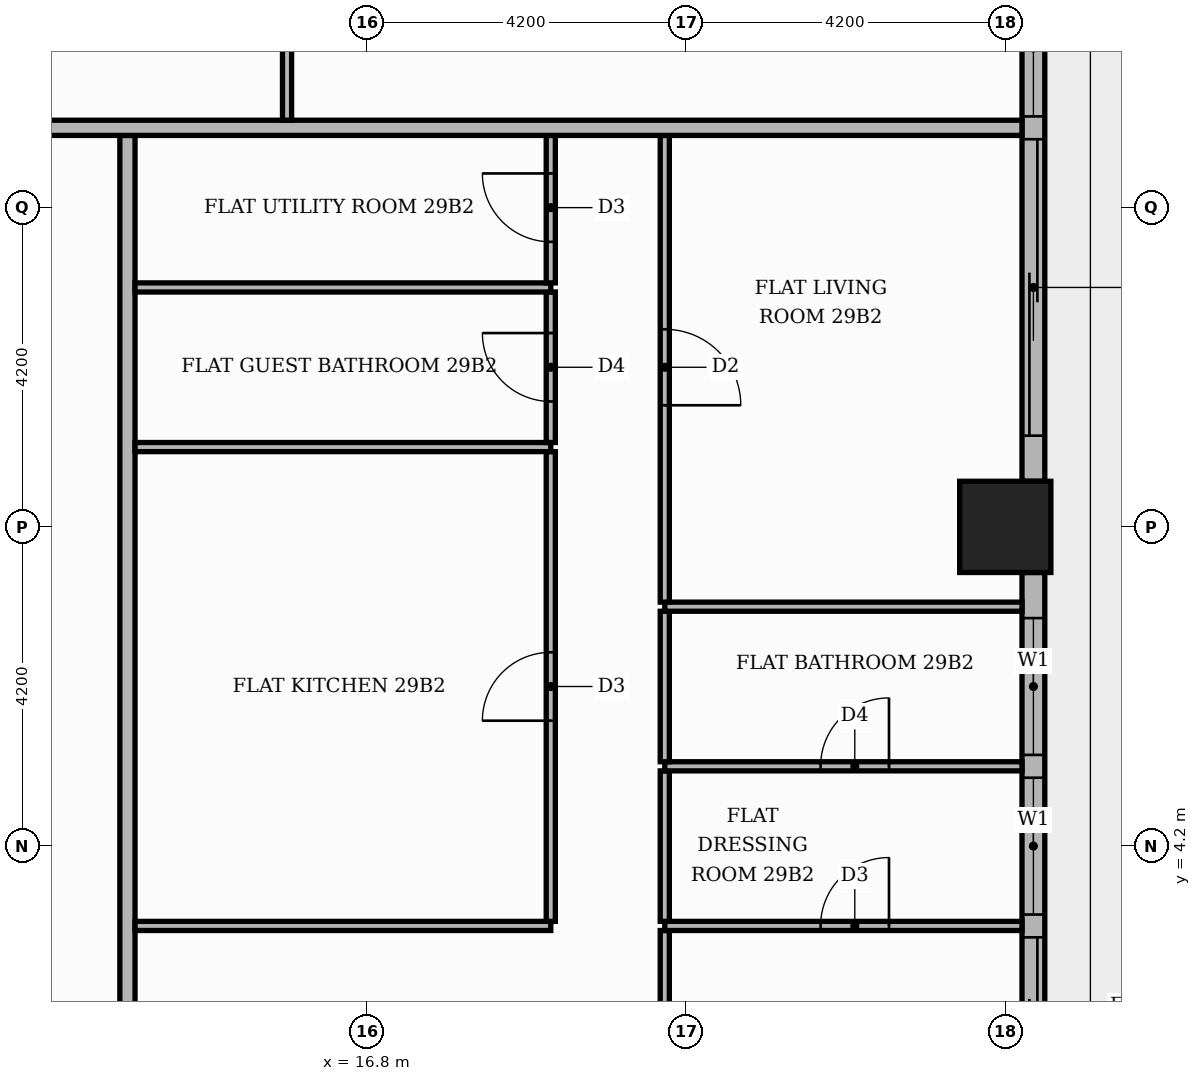
"""IFC4 building model, lengths in metres.
Left out: names, types, materials, properties, quantities, classifications, styles, units other than length and angle.
Written with IfcOpenShell. Run it as: python <this file> out.ifc"""

import sys

from ifc_helpers import new_model, si_unit, direction, frame, frame_2d, origin, origin_2d, place, context, subcontext, project, spatial, rectangle, extrude, element, fill, save


model = new_model("IFC4")
c1 = context("Model", 3, precision=1e-05, world=origin(), true_north=direction((0.0, 1.0)))
c2 = subcontext(c1, "Body", "Model", "MODEL_VIEW")
j1 = project(units=[si_unit("LENGTHUNIT", "METRE"), si_unit("PLANEANGLEUNIT", "RADIAN")], contexts=[c1])
p1 = place(None, origin())
s1 = spatial("IfcSite", under=j1, at=p1, CompositionType="ELEMENT")
p2 = place(p1, origin())
s2 = spatial("IfcBuilding", under=s1, at=p2, CompositionType="ELEMENT")
p3 = place(p2, frame((0.0, 0.0, 122.1)))
s3 = spatial("IfcBuildingStorey", under=s2, at=p3, CompositionType="ELEMENT", Elevation=122.1)
p4 = place(p3, frame((25.2, 8.4, 0.0), z_axis=(0.0, 0.0, 1.0), x_axis=(1.0, 0.0, 0.0)))
e1 = element("IfcColumn", 1, at=p4, inside=s3, PredefinedType="COLUMN", context=c2, shape_type="SweptSolid", body=[
    extrude(rectangle(XDim=1.2, YDim=1.2, at=origin_2d()), origin(), (0.0, 0.0, 1.0), 3.9),
])
p5 = place(p3, frame((25.57, 0.6, 0.0), z_axis=(0.0, 0.0, 1.0), x_axis=(0.0, 1.0, 0.0)))
e2 = element("IfcWall", 2, at=p5, inside=s3, PredefinedType="STANDARD", context=c2, shape_type="SweptSolid", body=[
    extrude(rectangle(XDim=7.2, YDim=0.3, at=frame_2d((3.6, 0.0))), origin(), (0.0, 0.0, 1.0), 3.4),
])
p6 = place(p5, frame((0.6, 0.0, 0.0)))
e3 = element("IfcOpeningElement", 3, at=p6, cuts=e2, PredefinedType="OPENING", context=c2, shape_type="SweptSolid", body=[
    extrude(rectangle(XDim=1.8, YDim=2.4, at=frame_2d((0.9, 1.2))), frame((0.0, 0.16, 0.0), z_axis=(0.0, -1.0, 0.0), x_axis=(1.0, 0.0, 0.0)), (0.0, 0.0, 1.0), 0.32),
])
p7 = place(p5, frame((2.7, 0.0, 0.9)))
e4 = element("IfcOpeningElement", 4, at=p7, cuts=e2, PredefinedType="OPENING", context=c2, shape_type="SweptSolid", body=[
    extrude(rectangle(XDim=1.8, YDim=2.1, at=frame_2d((0.9, 1.05))), frame((0.0, 0.16, 0.0), z_axis=(0.0, -1.0, 0.0), x_axis=(1.0, 0.0, 0.0)), (0.0, 0.0, 1.0), 0.32),
])
p8 = place(p5, frame((4.8, 0.0, 0.9)))
e5 = element("IfcOpeningElement", 5, at=p8, cuts=e2, PredefinedType="OPENING", context=c2, shape_type="SweptSolid", body=[
    extrude(rectangle(XDim=1.8, YDim=2.1, at=frame_2d((0.9, 1.05))), frame((0.0, 0.16, 0.0), z_axis=(0.0, -1.0, 0.0), x_axis=(1.0, 0.0, 0.0)), (0.0, 0.0, 1.0), 0.32),
])
p9 = place(p3, frame((25.57, 9.0, 0.0), z_axis=(0.0, 0.0, 1.0), x_axis=(0.0, 1.0, 0.0)))
e6 = element("IfcWall", 6, at=p9, inside=s3, PredefinedType="STANDARD", context=c2, shape_type="SweptSolid", body=[
    extrude(rectangle(XDim=7.2, YDim=0.3, at=frame_2d((3.6, 0.0))), origin(), (0.0, 0.0, 1.0), 3.4),
])
p10 = place(p9, frame((0.6, 0.0, 0.0)))
e7 = element("IfcOpeningElement", 7, at=p10, cuts=e6, PredefinedType="OPENING", context=c2, shape_type="SweptSolid", body=[
    extrude(rectangle(XDim=3.9, YDim=2.4, at=frame_2d((1.95, 1.2))), frame((0.0, 0.16, 0.0), z_axis=(0.0, -1.0, 0.0), x_axis=(1.0, 0.0, 0.0)), (0.0, 0.0, 1.0), 0.32),
])
p11 = place(p9, frame((4.8, 0.0, 0.9)))
e8 = element("IfcOpeningElement", 8, at=p11, cuts=e6, PredefinedType="OPENING", context=c2, shape_type="SweptSolid", body=[
    extrude(rectangle(XDim=1.8, YDim=2.1, at=frame_2d((0.9, 1.05))), frame((0.0, 0.16, 0.0), z_axis=(0.0, -1.0, 0.0), x_axis=(1.0, 0.0, 0.0)), (0.0, 0.0, 1.0), 0.32),
])
p12 = place(p3, frame((13.65, -5.15, 0.0), z_axis=(0.0, 0.0, 1.0), x_axis=(0.0, 1.0, 0.0)))
e9 = element("IfcWall", 9, at=p12, inside=s3, PredefinedType="PARTITIONING", context=c2, shape_type="SweptSolid", body=[
    extrude(rectangle(XDim=18.7, YDim=0.2, at=frame_2d((9.35, 0.0))), origin(), (0.0, 0.0, 1.0), 3.4),
])
p13 = place(p12, frame((5.65, 0.0, 0.0)))
e10 = element("IfcOpeningElement", 10, at=p13, cuts=e9, PredefinedType="OPENING", context=c2, shape_type="SweptSolid", body=[
    extrude(rectangle(XDim=1.1, YDim=2.4, at=frame_2d((0.55, 1.2))), frame((0.0, 0.11, 0.0), z_axis=(0.0, -1.0, 0.0), x_axis=(1.0, 0.0, 0.0)), (0.0, 0.0, 1.0), 0.22),
])
p14 = place(p3, frame((20.72, -5.15, 0.0), z_axis=(0.0, 0.0, 1.0), x_axis=(0.0, 1.0, 0.0)))
e11 = element("IfcWall", 11, at=p14, inside=s3, PredefinedType="PARTITIONING", context=c2, shape_type="SweptSolid", body=[
    extrude(rectangle(XDim=8.24, YDim=0.12, at=frame_2d((4.12, 0.0))), origin(), (0.0, 0.0, 1.0), 3.4),
])
p15 = place(p14, frame((3.65, 0.0, 0.0)))
e12 = element("IfcOpeningElement", 12, at=p15, cuts=e11, PredefinedType="OPENING", context=c2, shape_type="SweptSolid", body=[
    extrude(rectangle(XDim=0.9, YDim=2.1, at=frame_2d((0.45, 1.05))), frame((0.0, 0.07, 0.0), z_axis=(0.0, -1.0, 0.0), x_axis=(1.0, 0.0, 0.0)), (0.0, 0.0, 1.0), 0.14),
])
p16 = place(p3, frame((13.75, 3.15, 0.0), z_axis=(0.0, 0.0, 1.0), x_axis=(1.0, 0.0, 0.0)))
e13 = element("IfcWall", 13, at=p16, inside=s3, PredefinedType="PARTITIONING", context=c2, shape_type="SweptSolid", body=[
    extrude(rectangle(XDim=5.47, YDim=0.12, at=frame_2d((2.735, 0.0))), origin(), (0.0, 0.0, 1.0), 3.4),
])
p17 = place(p3, frame((20.72, 3.15, 0.0), z_axis=(0.0, 0.0, 1.0), x_axis=(1.0, 0.0, 0.0)))
e14 = element("IfcWall", 14, at=p17, inside=s3, PredefinedType="PARTITIONING", context=c2, shape_type="SweptSolid", body=[
    extrude(rectangle(XDim=4.7, YDim=0.12, at=frame_2d((2.35, 0.0))), origin(), (0.0, 0.0, 1.0), 3.4),
])
p18 = place(p17, frame((2.05, 0.0, 0.0)))
e15 = element("IfcOpeningElement", 15, at=p18, cuts=e14, PredefinedType="OPENING", context=c2, shape_type="SweptSolid", body=[
    extrude(rectangle(XDim=0.9, YDim=2.1, at=frame_2d((0.45, 1.05))), frame((0.0, 0.07, 0.0), z_axis=(0.0, -1.0, 0.0), x_axis=(1.0, 0.0, 0.0)), (0.0, 0.0, 1.0), 0.14),
])
p19 = place(p3, frame((19.22, 3.21, 0.0), z_axis=(0.0, 0.0, 1.0), x_axis=(0.0, 1.0, 0.0)))
e16 = element("IfcWall", 16, at=p19, inside=s3, PredefinedType="PARTITIONING", context=c2, shape_type="SweptSolid", body=[
    extrude(rectangle(XDim=6.18, YDim=0.12, at=frame_2d((3.09, 0.0))), origin(), (0.0, 0.0, 1.0), 3.4),
])
p20 = place(p19, frame((2.64, 0.0, 0.0)))
e17 = element("IfcOpeningElement", 17, at=p20, cuts=e16, PredefinedType="OPENING", context=c2, shape_type="SweptSolid", body=[
    extrude(rectangle(XDim=0.9, YDim=2.1, at=frame_2d((0.45, 1.05))), frame((0.0, 0.07, 0.0), z_axis=(0.0, -1.0, 0.0), x_axis=(1.0, 0.0, 0.0)), (0.0, 0.0, 1.0), 0.14),
])
p21 = place(p3, frame((20.72, 3.21, 0.0), z_axis=(0.0, 0.0, 1.0), x_axis=(0.0, 1.0, 0.0)))
e18 = element("IfcWall", 18, at=p21, inside=s3, PredefinedType="PARTITIONING", context=c2, shape_type="SweptSolid", body=[
    extrude(rectangle(XDim=1.98, YDim=0.12, at=frame_2d((0.99, 0.0))), origin(), (0.0, 0.0, 1.0), 3.4),
])
p22 = place(p3, frame((20.72, 5.25, 0.0), z_axis=(0.0, 0.0, 1.0), x_axis=(1.0, 0.0, 0.0)))
e19 = element("IfcWall", 19, at=p22, inside=s3, PredefinedType="PARTITIONING", context=c2, shape_type="SweptSolid", body=[
    extrude(rectangle(XDim=4.7, YDim=0.12, at=frame_2d((2.35, 0.0))), origin(), (0.0, 0.0, 1.0), 3.4),
])
p23 = place(p22, frame((2.05, 0.0, 0.0)))
e20 = element("IfcOpeningElement", 20, at=p23, cuts=e19, PredefinedType="OPENING", context=c2, shape_type="SweptSolid", body=[
    extrude(rectangle(XDim=0.9, YDim=2.1, at=frame_2d((0.45, 1.05))), frame((0.0, 0.07, 0.0), z_axis=(0.0, -1.0, 0.0), x_axis=(1.0, 0.0, 0.0)), (0.0, 0.0, 1.0), 0.14),
])
p24 = place(p3, frame((20.72, 5.31, 0.0), z_axis=(0.0, 0.0, 1.0), x_axis=(0.0, 1.0, 0.0)))
e21 = element("IfcWall", 21, at=p24, inside=s3, PredefinedType="PARTITIONING", context=c2, shape_type="SweptSolid", body=[
    extrude(rectangle(XDim=1.98, YDim=0.12, at=frame_2d((0.99, 0.0))), origin(), (0.0, 0.0, 1.0), 3.4),
])
p25 = place(p3, frame((20.72, 7.35, 0.0), z_axis=(0.0, 0.0, 1.0), x_axis=(1.0, 0.0, 0.0)))
e22 = element("IfcWall", 22, at=p25, inside=s3, PredefinedType="PARTITIONING", context=c2, shape_type="SweptSolid", body=[
    extrude(rectangle(XDim=4.7, YDim=0.12, at=frame_2d((2.35, 0.0))), origin(), (0.0, 0.0, 1.0), 3.4),
])
p26 = place(p3, frame((20.72, 7.41, 0.0), z_axis=(0.0, 0.0, 1.0), x_axis=(0.0, 1.0, 0.0)))
e23 = element("IfcWall", 23, at=p26, inside=s3, PredefinedType="PARTITIONING", context=c2, shape_type="SweptSolid", body=[
    extrude(rectangle(XDim=6.14, YDim=0.12, at=frame_2d((3.07, 0.0))), origin(), (0.0, 0.0, 1.0), 3.4),
])
p27 = place(p26, frame((2.59, 0.0, 0.0)))
e24 = element("IfcOpeningElement", 24, at=p27, cuts=e23, PredefinedType="OPENING", context=c2, shape_type="SweptSolid", body=[
    extrude(rectangle(XDim=1.0, YDim=2.1, at=frame_2d((0.5, 1.05))), frame((0.0, 0.07, 0.0), z_axis=(0.0, -1.0, 0.0), x_axis=(1.0, 0.0, 0.0)), (0.0, 0.0, 1.0), 0.14),
])
p28 = place(p3, frame((13.75, 9.45, 0.0), z_axis=(0.0, 0.0, 1.0), x_axis=(1.0, 0.0, 0.0)))
e25 = element("IfcWall", 25, at=p28, inside=s3, PredefinedType="PARTITIONING", context=c2, shape_type="SweptSolid", body=[
    extrude(rectangle(XDim=5.47, YDim=0.12, at=frame_2d((2.735, 0.0))), origin(), (0.0, 0.0, 1.0), 3.4),
])
p29 = place(p3, frame((19.22, 9.51, 0.0), z_axis=(0.0, 0.0, 1.0), x_axis=(0.0, 1.0, 0.0)))
e26 = element("IfcWall", 26, at=p29, inside=s3, PredefinedType="PARTITIONING", context=c2, shape_type="SweptSolid", body=[
    extrude(rectangle(XDim=1.98, YDim=0.12, at=frame_2d((0.99, 0.0))), origin(), (0.0, 0.0, 1.0), 3.4),
])
p30 = place(p29, frame((0.54, 0.0, 0.0)))
e27 = element("IfcOpeningElement", 27, at=p30, cuts=e26, PredefinedType="OPENING", context=c2, shape_type="SweptSolid", body=[
    extrude(rectangle(XDim=0.9, YDim=2.1, at=frame_2d((0.45, 1.05))), frame((0.0, 0.07, 0.0), z_axis=(0.0, -1.0, 0.0), x_axis=(1.0, 0.0, 0.0)), (0.0, 0.0, 1.0), 0.14),
])
p31 = place(p3, frame((13.75, 11.55, 0.0), z_axis=(0.0, 0.0, 1.0), x_axis=(1.0, 0.0, 0.0)))
e28 = element("IfcWall", 28, at=p31, inside=s3, PredefinedType="PARTITIONING", context=c2, shape_type="SweptSolid", body=[
    extrude(rectangle(XDim=5.47, YDim=0.12, at=frame_2d((2.735, 0.0))), origin(), (0.0, 0.0, 1.0), 3.4),
])
p32 = place(p3, frame((19.22, 11.61, 0.0), z_axis=(0.0, 0.0, 1.0), x_axis=(0.0, 1.0, 0.0)))
e29 = element("IfcWall", 29, at=p32, inside=s3, PredefinedType="PARTITIONING", context=c2, shape_type="SweptSolid", body=[
    extrude(rectangle(XDim=1.94, YDim=0.12, at=frame_2d((0.97, 0.0))), origin(), (0.0, 0.0, 1.0), 3.4),
])
p33 = place(p32, frame((0.54, 0.0, 0.0)))
e30 = element("IfcOpeningElement", 30, at=p33, cuts=e29, PredefinedType="OPENING", context=c2, shape_type="SweptSolid", body=[
    extrude(rectangle(XDim=0.9, YDim=2.1, at=frame_2d((0.45, 1.05))), frame((0.0, 0.07, 0.0), z_axis=(0.0, -1.0, 0.0), x_axis=(1.0, 0.0, 0.0)), (0.0, 0.0, 1.0), 0.14),
])
p34 = place(p3, frame((-13.65, 13.65, 0.0), z_axis=(0.0, 0.0, 1.0), x_axis=(1.0, 0.0, 0.0)))
e31 = element("IfcWall", 31, at=p34, inside=s3, PredefinedType="PARTITIONING", context=c2, shape_type="SweptSolid", body=[
    extrude(rectangle(XDim=39.07, YDim=0.2, at=frame_2d((19.535, 0.0))), origin(), (0.0, 0.0, 1.0), 3.4),
])
p35 = place(p34, frame((24.65, 0.0, 0.0)))
e32 = element("IfcOpeningElement", 32, at=p35, cuts=e31, PredefinedType="OPENING", context=c2, shape_type="SweptSolid", body=[
    extrude(rectangle(XDim=1.1, YDim=2.4, at=frame_2d((0.55, 1.2))), frame((0.0, 0.11, 0.0), z_axis=(0.0, -1.0, 0.0), x_axis=(1.0, 0.0, 0.0)), (0.0, 0.0, 1.0), 0.22),
])
p36 = place(p34, frame((12.05, 0.0, 0.0)))
e33 = element("IfcOpeningElement", 33, at=p36, cuts=e31, PredefinedType="OPENING", context=c2, shape_type="SweptSolid", body=[
    extrude(rectangle(XDim=1.1, YDim=2.4, at=frame_2d((0.55, 1.2))), frame((0.0, 0.11, 0.0), z_axis=(0.0, -1.0, 0.0), x_axis=(1.0, 0.0, 0.0)), (0.0, 0.0, 1.0), 0.22),
])
p37 = place(p3, frame((15.75, 13.75, 0.0), z_axis=(0.0, 0.0, 1.0), x_axis=(0.0, 1.0, 0.0)))
e34 = element("IfcWall", 34, at=p37, inside=s3, PredefinedType="PARTITIONING", context=c2, shape_type="SweptSolid", body=[
    extrude(rectangle(XDim=6.01, YDim=0.12, at=frame_2d((3.005, 0.0))), origin(), (0.0, 0.0, 1.0), 3.4),
])
p38 = place(p37, frame((2.485, 0.0, 0.0)))
e35 = element("IfcOpeningElement", 35, at=p38, cuts=e34, PredefinedType="OPENING", context=c2, shape_type="SweptSolid", body=[
    extrude(rectangle(XDim=1.0, YDim=2.1, at=frame_2d((0.5, 1.05))), frame((0.0, 0.07, 0.0), z_axis=(0.0, -1.0, 0.0), x_axis=(1.0, 0.0, 0.0)), (0.0, 0.0, 1.0), 0.14),
])
p39 = place(p6, origin())
e36 = element("IfcDoor", 36, at=p39, inside=s3, OperationType="SLIDING_TO_LEFT", PredefinedType="DOOR", context=c2, shape_type="SweptSolid", body=[
    extrude(rectangle(XDim=1.8, YDim=2.4, at=frame_2d((0.9, 1.2))), frame((0.0, 0.025, 0.0), z_axis=(0.0, -1.0, 0.0), x_axis=(1.0, 0.0, 0.0)), (0.0, 0.0, 1.0), 0.05),
])
fill(e3, e36)
p40 = place(p7, origin())
e37 = element("IfcWindow", 37, at=p40, inside=s3, PartitioningType="SINGLE_PANEL", PredefinedType="WINDOW", context=c2, shape_type="SweptSolid", body=[
    extrude(rectangle(XDim=1.8, YDim=2.1, at=frame_2d((0.9, 1.05))), frame((0.0, 0.03, 0.0), z_axis=(0.0, -1.0, 0.0), x_axis=(1.0, 0.0, 0.0)), (0.0, 0.0, 1.0), 0.06),
])
fill(e4, e37)
p41 = place(p8, origin())
e38 = element("IfcWindow", 38, at=p41, inside=s3, PartitioningType="SINGLE_PANEL", PredefinedType="WINDOW", context=c2, shape_type="SweptSolid", body=[
    extrude(rectangle(XDim=1.8, YDim=2.1, at=frame_2d((0.9, 1.05))), frame((0.0, 0.03, 0.0), z_axis=(0.0, -1.0, 0.0), x_axis=(1.0, 0.0, 0.0)), (0.0, 0.0, 1.0), 0.06),
])
fill(e5, e38)
p42 = place(p10, origin())
e39 = element("IfcDoor", 39, at=p42, inside=s3, OperationType="SLIDING_TO_LEFT", PredefinedType="DOOR", context=c2, shape_type="SweptSolid", body=[
    extrude(rectangle(XDim=3.9, YDim=2.4, at=frame_2d((1.95, 1.2))), frame((0.0, 0.025, 0.0), z_axis=(0.0, -1.0, 0.0), x_axis=(1.0, 0.0, 0.0)), (0.0, 0.0, 1.0), 0.05),
])
fill(e7, e39)
p43 = place(p11, origin())
e40 = element("IfcWindow", 40, at=p43, inside=s3, PartitioningType="SINGLE_PANEL", PredefinedType="WINDOW", context=c2, shape_type="SweptSolid", body=[
    extrude(rectangle(XDim=1.8, YDim=2.1, at=frame_2d((0.9, 1.05))), frame((0.0, 0.03, 0.0), z_axis=(0.0, -1.0, 0.0), x_axis=(1.0, 0.0, 0.0)), (0.0, 0.0, 1.0), 0.06),
])
fill(e8, e40)
p44 = place(p20, origin())
e41 = element("IfcDoor", 41, at=p44, inside=s3, OperationType="SINGLE_SWING_LEFT", PredefinedType="DOOR", context=c2, shape_type="SweptSolid", body=[
    extrude(rectangle(XDim=0.9, YDim=2.1, at=frame_2d((0.45, 1.05))), frame((0.0, 0.025, 0.0), z_axis=(0.0, -1.0, 0.0), x_axis=(1.0, 0.0, 0.0)), (0.0, 0.0, 1.0), 0.05),
])
fill(e17, e41)
p45 = place(p30, origin())
e42 = element("IfcDoor", 42, at=p45, inside=s3, OperationType="SINGLE_SWING_RIGHT", PredefinedType="DOOR", context=c2, shape_type="SweptSolid", body=[
    extrude(rectangle(XDim=0.9, YDim=2.1, at=frame_2d((0.45, 1.05))), frame((0.0, 0.025, 0.0), z_axis=(0.0, -1.0, 0.0), x_axis=(1.0, 0.0, 0.0)), (0.0, 0.0, 1.0), 0.05),
])
fill(e27, e42)
p46 = place(p33, origin())
e43 = element("IfcDoor", 43, at=p46, inside=s3, OperationType="SINGLE_SWING_RIGHT", PredefinedType="DOOR", context=c2, shape_type="SweptSolid", body=[
    extrude(rectangle(XDim=0.9, YDim=2.1, at=frame_2d((0.45, 1.05))), frame((0.0, 0.025, 0.0), z_axis=(0.0, -1.0, 0.0), x_axis=(1.0, 0.0, 0.0)), (0.0, 0.0, 1.0), 0.05),
])
fill(e30, e43)
p47 = place(p18, origin())
e44 = element("IfcDoor", 44, at=p47, inside=s3, OperationType="SINGLE_SWING_RIGHT", PredefinedType="DOOR", context=c2, shape_type="SweptSolid", body=[
    extrude(rectangle(XDim=0.9, YDim=2.1, at=frame_2d((0.45, 1.05))), frame((0.0, 0.025, 0.0), z_axis=(0.0, -1.0, 0.0), x_axis=(1.0, 0.0, 0.0)), (0.0, 0.0, 1.0), 0.05),
])
fill(e15, e44)
p48 = place(p23, origin())
e45 = element("IfcDoor", 45, at=p48, inside=s3, OperationType="SINGLE_SWING_RIGHT", PredefinedType="DOOR", context=c2, shape_type="SweptSolid", body=[
    extrude(rectangle(XDim=0.9, YDim=2.1, at=frame_2d((0.45, 1.05))), frame((0.0, 0.025, 0.0), z_axis=(0.0, -1.0, 0.0), x_axis=(1.0, 0.0, 0.0)), (0.0, 0.0, 1.0), 0.05),
])
fill(e20, e45)
p49 = place(p27, frame((1.0, 0.0, 0.0), z_axis=(0.0, 0.0, 1.0), x_axis=(-1.0, 0.0, 0.0)))
e46 = element("IfcDoor", 46, at=p49, inside=s3, OperationType="SINGLE_SWING_LEFT", PredefinedType="DOOR", context=c2, shape_type="SweptSolid", body=[
    extrude(rectangle(XDim=1.0, YDim=2.1, at=frame_2d((0.5, 1.05))), frame((0.0, 0.025, 0.0), z_axis=(0.0, -1.0, 0.0), x_axis=(1.0, 0.0, 0.0)), (0.0, 0.0, 1.0), 0.05),
])
fill(e24, e46)
save(model, sys.argv[1])
